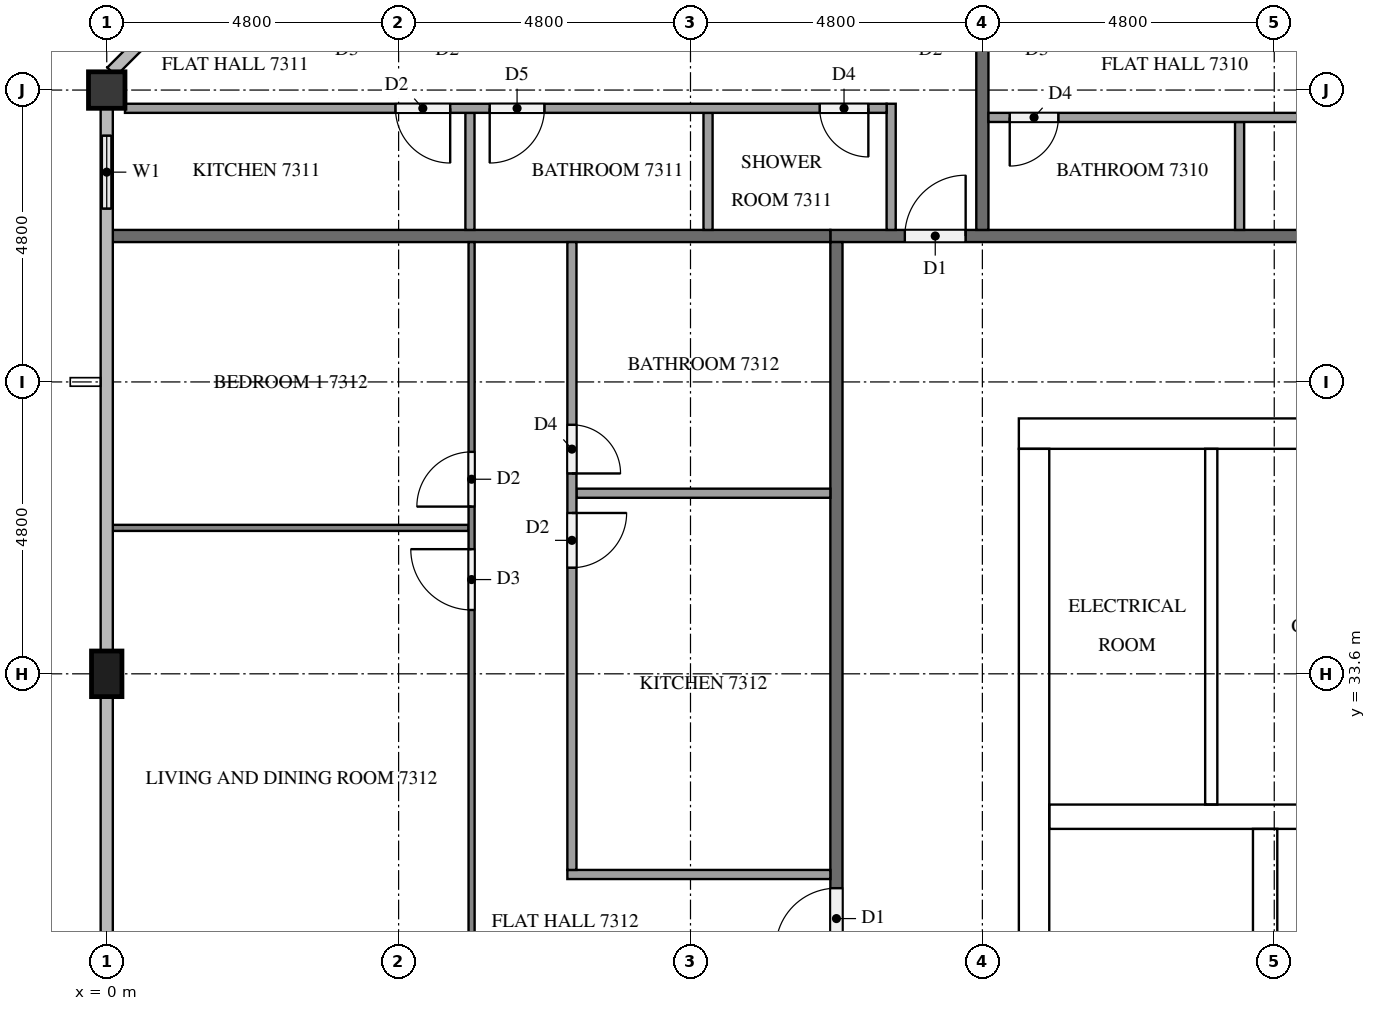
"""IFC4 building model, lengths in metres.
Left out: names, types, materials, properties, quantities, classifications, styles, units other than length and angle.
Written with IfcOpenShell. Run it as: python <this file> out.ifc"""

import sys

from ifc_helpers import new_model, si_unit, direction, frame, frame_2d, origin, origin_2d, place, context, subcontext, project, spatial, rectangle, extrude, element, fill, save


model = new_model("IFC4")
c1 = context("Model", 3, precision=1e-05, world=origin(), true_north=direction((0.0, 1.0)))
c2 = subcontext(c1, "Body", "Model", "MODEL_VIEW")
j1 = project(units=[si_unit("LENGTHUNIT", "METRE"), si_unit("PLANEANGLEUNIT", "RADIAN")], contexts=[c1])
p1 = place(None, origin())
s1 = spatial("IfcSite", under=j1, at=p1, CompositionType="ELEMENT")
p2 = place(p1, origin())
s2 = spatial("IfcBuilding", under=s1, at=p2, CompositionType="ELEMENT")
p3 = place(p2, frame((0.0, 0.0, 279.1)))
s3 = spatial("IfcBuildingStorey", under=s2, at=p3, CompositionType="ELEMENT", Elevation=279.1)
p4 = place(p3, frame((15.0, 37.55, 0.0), z_axis=(0.0, 0.0, 1.0), x_axis=(1.0, 0.0, 0.0)))
e1 = element("IfcWall", 1, at=p4, inside=s3, PredefinedType="SHEAR", context=c2, shape_type="SweptSolid", body=[
    extrude(rectangle(XDim=32.4, YDim=0.5, at=frame_2d((16.2, 0.0))), origin(), (0.0, 0.0, 1.0), 3.2),
])
p5 = place(p4, frame((15.3, 0.0, 0.0)))
e2 = element("IfcOpeningElement", 2, at=p5, cuts=e1, PredefinedType="OPENING", context=c2, shape_type="SweptSolid", body=[
    extrude(rectangle(XDim=1.8, YDim=2.1, at=frame_2d((0.9, 1.05))), frame((0.0, 0.26, 0.0), z_axis=(0.0, -1.0, 0.0), x_axis=(1.0, 0.0, 0.0)), (0.0, 0.0, 1.0), 0.52),
])
p6 = place(p4, frame((1.282, 0.0, 0.0)))
e3 = element("IfcOpeningElement", 3, at=p6, cuts=e1, PredefinedType="OPENING", context=c2, shape_type="SweptSolid", body=[
    extrude(rectangle(XDim=1.0, YDim=2.1, at=frame_2d((0.5, 1.05))), frame((0.0, 0.26, 0.0), z_axis=(0.0, -1.0, 0.0), x_axis=(1.0, 0.0, 0.0)), (0.0, 0.0, 1.0), 0.52),
])
p7 = place(p4, frame((5.082, 0.0, 0.0)))
e4 = element("IfcOpeningElement", 4, at=p7, cuts=e1, PredefinedType="OPENING", context=c2, shape_type="SweptSolid", body=[
    extrude(rectangle(XDim=1.0, YDim=2.1, at=frame_2d((0.5, 1.05))), frame((0.0, 0.26, 0.0), z_axis=(0.0, -1.0, 0.0), x_axis=(1.0, 0.0, 0.0)), (0.0, 0.0, 1.0), 0.52),
])
p8 = place(p3, frame((15.25, 15.5, 0.0), z_axis=(0.0, 0.0, 1.0), x_axis=(0.0, 1.0, 0.0)))
e5 = element("IfcWall", 5, at=p8, inside=s3, PredefinedType="SHEAR", context=c2, shape_type="SweptSolid", body=[
    extrude(rectangle(XDim=21.8, YDim=0.5, at=frame_2d((10.9, 0.0))), origin(), (0.0, 0.0, 1.0), 3.2),
])
p9 = place(p8, frame((5.26, 0.0, 0.0)))
e6 = element("IfcOpeningElement", 6, at=p9, cuts=e5, PredefinedType="OPENING", context=c2, shape_type="SweptSolid", body=[
    extrude(rectangle(XDim=1.2, YDim=2.1, at=frame_2d((0.6, 1.05))), frame((0.0, 0.26, 0.0), z_axis=(0.0, -1.0, 0.0), x_axis=(1.0, 0.0, 0.0)), (0.0, 0.0, 1.0), 0.52),
])
p10 = place(p3, frame((19.05, 15.5, 0.0), z_axis=(0.0, 0.0, 1.0), x_axis=(0.0, 1.0, 0.0)))
e7 = element("IfcWall", 7, at=p10, inside=s3, PredefinedType="SHEAR", context=c2, shape_type="SweptSolid", body=[
    extrude(rectangle(XDim=15.55, YDim=0.4, at=frame_2d((7.775, 0.0))), origin(), (0.0, 0.0, 1.0), 3.2),
])
p11 = place(p10, frame((9.95, 0.0, 0.0)))
e8 = element("IfcOpeningElement", 8, at=p11, cuts=e7, PredefinedType="OPENING", context=c2, shape_type="SweptSolid", body=[
    extrude(rectangle(XDim=1.1, YDim=2.1, at=frame_2d((0.55, 1.05))), frame((0.0, 0.21, 0.0), z_axis=(0.0, -1.0, 0.0), x_axis=(1.0, 0.0, 0.0)), (0.0, 0.0, 1.0), 0.42),
])
p12 = place(p10, frame((13.45, 0.0, 0.0)))
e9 = element("IfcOpeningElement", 9, at=p12, cuts=e7, PredefinedType="OPENING", context=c2, shape_type="SweptSolid", body=[
    extrude(rectangle(XDim=1.1, YDim=2.1, at=frame_2d((0.55, 1.05))), frame((0.0, 0.21, 0.0), z_axis=(0.0, -1.0, 0.0), x_axis=(1.0, 0.0, 0.0)), (0.0, 0.0, 1.0), 0.42),
])
p13 = place(p10, frame((0.7, 0.0, 0.0)))
e10 = element("IfcOpeningElement", 10, at=p13, cuts=e7, PredefinedType="OPENING", context=c2, shape_type="SweptSolid", body=[
    extrude(rectangle(XDim=1.2, YDim=2.1, at=frame_2d((0.6, 1.05))), frame((0.0, 0.21, 0.0), z_axis=(0.0, -1.0, 0.0), x_axis=(1.0, 0.0, 0.0)), (0.0, 0.0, 1.0), 0.42),
])
p14 = place(p3, frame((15.5, 31.25, 0.0), z_axis=(0.0, 0.0, 1.0), x_axis=(1.0, 0.0, 0.0)))
e11 = element("IfcWall", 11, at=p14, inside=s3, PredefinedType="SHEAR", context=c2, shape_type="SweptSolid", body=[
    extrude(rectangle(XDim=7.4, YDim=0.4, at=frame_2d((3.7, 0.0))), origin(), (0.0, 0.0, 1.0), 3.2),
])
p15 = place(p3, frame((0.0, 43.2, 0.0), z_axis=(0.0, 0.0, 1.0), x_axis=(1.0, 0.0, 0.0)))
e12 = element("IfcColumn", 12, at=p15, inside=s3, PredefinedType="COLUMN", context=c2, shape_type="SweptSolid", body=[
    extrude(rectangle(XDim=0.6, YDim=0.6, at=origin_2d()), origin(), (0.0, 0.0, 1.0), 3.2),
])
p16 = place(p3, frame((0.0, 33.6, 0.0), z_axis=(0.0, 0.0, 1.0), x_axis=(0.0, 1.0, 0.0)))
e13 = element("IfcColumn", 13, at=p16, inside=s3, PredefinedType="COLUMN", context=c2, shape_type="SweptSolid", body=[
    extrude(rectangle(XDim=0.75, YDim=0.5, at=origin_2d()), origin(), (0.0, 0.0, 1.0), 3.2),
])
p17 = place(p3, frame((0.0, 42.9, 0.0), z_axis=(0.0, 0.0, 1.0), x_axis=(0.0, -1.0, 0.0)))
e14 = element("IfcWall", 14, at=p17, inside=s3, PredefinedType="SOLIDWALL", context=c2, shape_type="SweptSolid", body=[
    extrude(rectangle(XDim=2.1, YDim=0.15, at=frame_2d((1.05, 0.0))), origin(), (0.0, 0.0, 1.0), 3.2),
])
p18 = place(p17, frame((0.45, 0.0, 0.9)))
e15 = element("IfcOpeningElement", 15, at=p18, cuts=e14, PredefinedType="OPENING", context=c2, shape_type="SweptSolid", body=[
    extrude(rectangle(XDim=1.2, YDim=1.4, at=frame_2d((0.6, 0.7))), frame((0.0, 0.085, 0.0), z_axis=(0.0, -1.0, 0.0), x_axis=(1.0, 0.0, 0.0)), (0.0, 0.0, 1.0), 0.17),
])
p19 = place(p3, frame((18.164, 31.45, 0.0), z_axis=(0.0, 0.0, 1.0), x_axis=(0.0, 1.0, 0.0)))
e16 = element("IfcWall", 16, at=p19, inside=s3, PredefinedType="PARTITIONING", context=c2, shape_type="SweptSolid", body=[
    extrude(rectangle(XDim=5.85, YDim=0.2, at=frame_2d((2.925, 0.0))), origin(), (0.0, 0.0, 1.0), 3.2),
])
p20 = place(p3, frame((11.9, 40.8, 0.0), z_axis=(0.0, 0.0, 1.0), x_axis=(1.0, 0.0, 0.0)))
e17 = element("IfcWall", 17, at=p20, inside=s3, PredefinedType="PARTITIONING", context=c2, shape_type="SweptSolid", body=[
    extrude(rectangle(XDim=38.6, YDim=0.2, at=frame_2d((19.3, 0.0))), origin(), (0.0, 0.0, 1.0), 3.2),
])
p21 = place(p20, frame((33.975, 0.0, 0.0)))
e18 = element("IfcOpeningElement", 18, at=p21, cuts=e17, PredefinedType="OPENING", context=c2, shape_type="SweptSolid", body=[
    extrude(rectangle(XDim=1.0, YDim=2.1, at=frame_2d((0.5, 1.05))), frame((0.0, 0.11, 0.0), z_axis=(0.0, -1.0, 0.0), x_axis=(1.0, 0.0, 0.0)), (0.0, 0.0, 1.0), 0.22),
])
p22 = place(p20, frame((14.725, 0.0, 0.0)))
e19 = element("IfcOpeningElement", 19, at=p22, cuts=e17, PredefinedType="OPENING", context=c2, shape_type="SweptSolid", body=[
    extrude(rectangle(XDim=1.1, YDim=2.1, at=frame_2d((0.55, 1.05))), frame((0.0, 0.11, 0.0), z_axis=(0.0, -1.0, 0.0), x_axis=(1.0, 0.0, 0.0)), (0.0, 0.0, 1.0), 0.22),
])
p23 = place(p20, frame((13.225, 0.0, 0.0)))
e20 = element("IfcOpeningElement", 20, at=p23, cuts=e17, PredefinedType="OPENING", context=c2, shape_type="SweptSolid", body=[
    extrude(rectangle(XDim=1.0, YDim=2.1, at=frame_2d((0.5, 1.05))), frame((0.0, 0.11, 0.0), z_axis=(0.0, -1.0, 0.0), x_axis=(1.0, 0.0, 0.0)), (0.0, 0.0, 1.0), 0.22),
])
p24 = place(p20, frame((1.225, 0.0, 0.0)))
e21 = element("IfcOpeningElement", 21, at=p24, cuts=e17, PredefinedType="OPENING", context=c2, shape_type="SweptSolid", body=[
    extrude(rectangle(XDim=1.0, YDim=2.1, at=frame_2d((0.5, 1.05))), frame((0.0, 0.11, 0.0), z_axis=(0.0, -1.0, 0.0), x_axis=(1.0, 0.0, 0.0)), (0.0, 0.0, 1.0), 0.22),
])
p25 = place(p3, frame((12.0, 12.1, 0.0), z_axis=(0.0, 0.0, 1.0), x_axis=(0.0, 1.0, 0.0)))
e22 = element("IfcWall", 22, at=p25, inside=s3, PredefinedType="PARTITIONING", context=c2, shape_type="SweptSolid", body=[
    extrude(rectangle(XDim=28.6, YDim=0.2, at=frame_2d((14.3, 0.0))), origin(), (0.0, 0.0, 1.0), 3.2),
])
p26 = place(p25, frame((16.975, 0.0, 0.0)))
e23 = element("IfcOpeningElement", 23, at=p26, cuts=e22, PredefinedType="OPENING", context=c2, shape_type="SweptSolid", body=[
    extrude(rectangle(XDim=1.0, YDim=2.1, at=frame_2d((0.5, 1.05))), frame((0.0, 0.11, 0.0), z_axis=(0.0, -1.0, 0.0), x_axis=(1.0, 0.0, 0.0)), (0.0, 0.0, 1.0), 0.22),
])
p27 = place(p25, frame((0.175, 0.0, 0.0)))
e24 = element("IfcOpeningElement", 24, at=p27, cuts=e22, PredefinedType="OPENING", context=c2, shape_type="SweptSolid", body=[
    extrude(rectangle(XDim=1.0, YDim=2.1, at=frame_2d((0.5, 1.05))), frame((0.0, 0.11, 0.0), z_axis=(0.0, -1.0, 0.0), x_axis=(1.0, 0.0, 0.0)), (0.0, 0.0, 1.0), 0.22),
])
p28 = place(p3, frame((14.4, 47.75, 0.0), z_axis=(0.0, 0.0, 1.0), x_axis=(0.0, -1.0, 0.0)))
e25 = element("IfcWall", 25, at=p28, inside=s3, PredefinedType="PARTITIONING", context=c2, shape_type="SweptSolid", body=[
    extrude(rectangle(XDim=6.85, YDim=0.2, at=frame_2d((3.425, 0.0))), origin(), (0.0, 0.0, 1.0), 3.2),
])
p29 = place(p3, frame((0.1, 40.8, 0.0), z_axis=(0.0, 0.0, 1.0), x_axis=(1.0, 0.0, 0.0)))
e26 = element("IfcWall", 26, at=p29, inside=s3, PredefinedType="PARTITIONING", context=c2, shape_type="SweptSolid", body=[
    extrude(rectangle(XDim=11.8, YDim=0.2, at=frame_2d((5.9, 0.0))), origin(), (0.0, 0.0, 1.0), 3.2),
])
p30 = place(p3, frame((18.63, 40.9, 0.0), z_axis=(0.0, 0.0, 1.0), x_axis=(0.0, 1.0, 0.0)))
e27 = element("IfcWall", 27, at=p30, inside=s3, PredefinedType="PARTITIONING", context=c2, shape_type="SweptSolid", body=[
    extrude(rectangle(XDim=1.775, YDim=0.15, at=frame_2d((0.888, 0.0))), origin(), (0.0, 0.0, 1.0), 3.2),
])
p31 = place(p3, frame((24.825, 42.75, 0.0), z_axis=(0.0, 0.0, 1.0), x_axis=(-1.0, 0.0, 0.0)))
e28 = element("IfcWall", 28, at=p31, inside=s3, PredefinedType="PARTITIONING", context=c2, shape_type="SweptSolid", body=[
    extrude(rectangle(XDim=10.325, YDim=0.15, at=frame_2d((5.163, 0.0))), origin(), (0.0, 0.0, 1.0), 3.2),
])
p32 = place(p31, frame((0.3, 0.0, 0.0)))
e29 = element("IfcOpeningElement", 29, at=p32, cuts=e28, PredefinedType="OPENING", context=c2, shape_type="SweptSolid", body=[
    extrude(rectangle(XDim=0.9, YDim=2.1, at=frame_2d((0.45, 1.05))), frame((0.0, 0.085, 0.0), z_axis=(0.0, -1.0, 0.0), x_axis=(1.0, 0.0, 0.0)), (0.0, 0.0, 1.0), 0.17),
])
p33 = place(p31, frame((9.175, 0.0, 0.0)))
e30 = element("IfcOpeningElement", 30, at=p33, cuts=e28, PredefinedType="OPENING", context=c2, shape_type="SweptSolid", body=[
    extrude(rectangle(XDim=0.8, YDim=2.1, at=frame_2d((0.4, 1.05))), frame((0.0, 0.085, 0.0), z_axis=(0.0, -1.0, 0.0), x_axis=(1.0, 0.0, 0.0)), (0.0, 0.0, 1.0), 0.17),
])
for number, where, z_axis, x_axis in (
    (31, (9.888, 40.9, 0.0), (0.0, 0.0, 1.0), (0.0, 1.0, 0.0)),
    (32, (5.973, 40.9, 0.0), (0.0, 0.0, 1.0), (0.0, 1.0, 0.0)),
):
    element("IfcWall", number, at=place(p3, frame(where, z_axis=z_axis, x_axis=x_axis)), inside=s3, PredefinedType="PARTITIONING", context=c2, shape_type="SweptSolid", body=[
        extrude(rectangle(XDim=1.925, YDim=0.15, at=frame_2d((0.962, 0.0))), origin(), (0.0, 0.0, 1.0), 3.2),
    ])
p34 = place(p3, frame((12.9, 40.9, 0.0), z_axis=(0.0, 0.0, 1.0), x_axis=(0.0, 1.0, 0.0)))
e33 = element("IfcWall", 33, at=p34, inside=s3, PredefinedType="PARTITIONING", context=c2, shape_type="SweptSolid", body=[
    extrude(rectangle(XDim=2.075, YDim=0.15, at=frame_2d((1.038, 0.0))), origin(), (0.0, 0.0, 1.0), 3.2),
])
p35 = place(p3, frame((12.825, 42.9, 0.0), z_axis=(0.0, 0.0, 1.0), x_axis=(-1.0, 0.0, 0.0)))
e34 = element("IfcWall", 34, at=p35, inside=s3, PredefinedType="PARTITIONING", context=c2, shape_type="SweptSolid", body=[
    extrude(rectangle(XDim=12.525, YDim=0.15, at=frame_2d((6.262, 0.0))), origin(), (0.0, 0.0, 1.0), 3.2),
])
p36 = place(p35, frame((0.3, 0.0, 0.0)))
e35 = element("IfcOpeningElement", 35, at=p36, cuts=e34, PredefinedType="OPENING", context=c2, shape_type="SweptSolid", body=[
    extrude(rectangle(XDim=0.8, YDim=2.1, at=frame_2d((0.4, 1.05))), frame((0.0, 0.085, 0.0), z_axis=(0.0, -1.0, 0.0), x_axis=(1.0, 0.0, 0.0)), (0.0, 0.0, 1.0), 0.17),
])
p37 = place(p35, frame((5.627, 0.0, 0.0)))
e36 = element("IfcOpeningElement", 36, at=p37, cuts=e34, PredefinedType="OPENING", context=c2, shape_type="SweptSolid", body=[
    extrude(rectangle(XDim=0.9, YDim=2.1, at=frame_2d((0.45, 1.05))), frame((0.0, 0.085, 0.0), z_axis=(0.0, -1.0, 0.0), x_axis=(1.0, 0.0, 0.0)), (0.0, 0.0, 1.0), 0.17),
])
p38 = place(p35, frame((7.177, 0.0, 0.0)))
e37 = element("IfcOpeningElement", 37, at=p38, cuts=e34, PredefinedType="OPENING", context=c2, shape_type="SweptSolid", body=[
    extrude(rectangle(XDim=0.9, YDim=2.1, at=frame_2d((0.45, 1.05))), frame((0.0, 0.085, 0.0), z_axis=(0.0, -1.0, 0.0), x_axis=(1.0, 0.0, 0.0)), (0.0, 0.0, 1.0), 0.17),
])
p39 = place(p3, frame((5.95, 36.0, 0.0), z_axis=(0.0, 0.0, 1.0), x_axis=(-1.0, 0.0, 0.0)))
e38 = element("IfcWall", 38, at=p39, inside=s3, PredefinedType="PARTITIONING", context=c2, shape_type="SweptSolid", body=[
    extrude(rectangle(XDim=5.85, YDim=0.1, at=frame_2d((2.925, 0.0))), origin(), (0.0, 0.0, 1.0), 3.2),
])
p40 = place(p3, frame((6.0, 28.9, 0.0), z_axis=(0.0, 0.0, 1.0), x_axis=(0.0, 1.0, 0.0)))
e39 = element("IfcWall", 39, at=p40, inside=s3, PredefinedType="PARTITIONING", context=c2, shape_type="SweptSolid", body=[
    extrude(rectangle(XDim=11.8, YDim=0.1, at=frame_2d((5.9, 0.0))), origin(), (0.0, 0.0, 1.0), 3.2),
])
p41 = place(p40, frame((5.75, 0.0, 0.0)))
e40 = element("IfcOpeningElement", 40, at=p41, cuts=e39, PredefinedType="OPENING", context=c2, shape_type="SweptSolid", body=[
    extrude(rectangle(XDim=1.0, YDim=2.1, at=frame_2d((0.5, 1.05))), frame((0.0, 0.06, 0.0), z_axis=(0.0, -1.0, 0.0), x_axis=(1.0, 0.0, 0.0)), (0.0, 0.0, 1.0), 0.12),
])
p42 = place(p40, frame((7.45, 0.0, 0.0)))
e41 = element("IfcOpeningElement", 41, at=p42, cuts=e39, PredefinedType="OPENING", context=c2, shape_type="SweptSolid", body=[
    extrude(rectangle(XDim=0.9, YDim=2.1, at=frame_2d((0.45, 1.05))), frame((0.0, 0.06, 0.0), z_axis=(0.0, -1.0, 0.0), x_axis=(1.0, 0.0, 0.0)), (0.0, 0.0, 1.0), 0.12),
])
p43 = place(p3, frame((11.9, 36.57, 0.0), z_axis=(0.0, 0.0, 1.0), x_axis=(-1.0, 0.0, 0.0)))
e42 = element("IfcWall", 42, at=p43, inside=s3, PredefinedType="PARTITIONING", context=c2, shape_type="SweptSolid", body=[
    extrude(rectangle(XDim=4.175, YDim=0.15, at=frame_2d((2.087, 0.0))), origin(), (0.0, 0.0, 1.0), 3.2),
])
p44 = place(p3, frame((11.9, 30.3, 0.0), z_axis=(0.0, 0.0, 1.0), x_axis=(-1.0, 0.0, 0.0)))
e43 = element("IfcWall", 43, at=p44, inside=s3, PredefinedType="PARTITIONING", context=c2, shape_type="SweptSolid", body=[
    extrude(rectangle(XDim=4.325, YDim=0.15, at=frame_2d((2.163, 0.0))), origin(), (0.0, 0.0, 1.0), 3.2),
])
p45 = place(p3, frame((7.65, 40.7, 0.0), z_axis=(0.0, 0.0, 1.0), x_axis=(0.0, -1.0, 0.0)))
e44 = element("IfcWall", 44, at=p45, inside=s3, PredefinedType="PARTITIONING", context=c2, shape_type="SweptSolid", body=[
    extrude(rectangle(XDim=10.325, YDim=0.15, at=frame_2d((5.163, 0.0))), origin(), (0.0, 0.0, 1.0), 3.2),
])
p46 = place(p45, frame((4.455, 0.0, 0.0)))
e45 = element("IfcOpeningElement", 45, at=p46, cuts=e44, PredefinedType="OPENING", context=c2, shape_type="SweptSolid", body=[
    extrude(rectangle(XDim=0.9, YDim=2.1, at=frame_2d((0.45, 1.05))), frame((0.0, 0.085, 0.0), z_axis=(0.0, -1.0, 0.0), x_axis=(1.0, 0.0, 0.0)), (0.0, 0.0, 1.0), 0.17),
])
p47 = place(p45, frame((3.005, 0.0, 0.0)))
e46 = element("IfcOpeningElement", 46, at=p47, cuts=e44, PredefinedType="OPENING", context=c2, shape_type="SweptSolid", body=[
    extrude(rectangle(XDim=0.8, YDim=2.1, at=frame_2d((0.4, 1.05))), frame((0.0, 0.085, 0.0), z_axis=(0.0, -1.0, 0.0), x_axis=(1.0, 0.0, 0.0)), (0.0, 0.0, 1.0), 0.17),
])
p48 = place(p18, origin())
e47 = element("IfcWindow", 47, at=p48, inside=s3, PartitioningType="SINGLE_PANEL", PredefinedType="WINDOW", context=c2, shape_type="SweptSolid", body=[
    extrude(rectangle(XDim=1.2, YDim=1.4, at=frame_2d((0.6, 0.7))), frame((0.0, 0.03, 0.0), z_axis=(0.0, -1.0, 0.0), x_axis=(1.0, 0.0, 0.0)), (0.0, 0.0, 1.0), 0.06),
])
fill(e15, e47)
p49 = place(p12, origin())
e48 = element("IfcDoor", 48, at=p49, inside=s3, OperationType="DOUBLE_DOOR_SLIDING", PredefinedType="DOOR", context=c2, shape_type="SweptSolid", body=[
    extrude(rectangle(XDim=1.1, YDim=2.1, at=frame_2d((0.55, 1.05))), frame((0.0, 0.025, 0.0), z_axis=(0.0, -1.0, 0.0), x_axis=(1.0, 0.0, 0.0)), (0.0, 0.0, 1.0), 0.05),
])
fill(e9, e48)
p50 = place(p6, origin())
e49 = element("IfcDoor", 49, at=p50, inside=s3, OperationType="SINGLE_SWING_RIGHT", PredefinedType="DOOR", context=c2, shape_type="SweptSolid", body=[
    extrude(rectangle(XDim=1.0, YDim=2.1, at=frame_2d((0.5, 1.05))), frame((0.0, 0.025, 0.0), z_axis=(0.0, -1.0, 0.0), x_axis=(1.0, 0.0, 0.0)), (0.0, 0.0, 1.0), 0.05),
])
fill(e3, e49)
p51 = place(p24, origin())
e50 = element("IfcDoor", 50, at=p51, inside=s3, OperationType="SINGLE_SWING_RIGHT", PredefinedType="DOOR", context=c2, shape_type="SweptSolid", body=[
    extrude(rectangle(XDim=1.0, YDim=2.1, at=frame_2d((0.5, 1.05))), frame((0.0, 0.025, 0.0), z_axis=(0.0, -1.0, 0.0), x_axis=(1.0, 0.0, 0.0)), (0.0, 0.0, 1.0), 0.05),
])
fill(e21, e50)
p52 = place(p26, origin())
e51 = element("IfcDoor", 51, at=p52, inside=s3, OperationType="SINGLE_SWING_LEFT", PredefinedType="DOOR", context=c2, shape_type="SweptSolid", body=[
    extrude(rectangle(XDim=1.0, YDim=2.1, at=frame_2d((0.5, 1.05))), frame((0.0, 0.025, 0.0), z_axis=(0.0, -1.0, 0.0), x_axis=(1.0, 0.0, 0.0)), (0.0, 0.0, 1.0), 0.05),
])
fill(e23, e51)
p53 = place(p33, origin())
e52 = element("IfcDoor", 52, at=p53, inside=s3, OperationType="SINGLE_SWING_RIGHT", PredefinedType="DOOR", context=c2, shape_type="SweptSolid", body=[
    extrude(rectangle(XDim=0.8, YDim=2.1, at=frame_2d((0.4, 1.05))), frame((0.0, 0.025, 0.0), z_axis=(0.0, -1.0, 0.0), x_axis=(1.0, 0.0, 0.0)), (0.0, 0.0, 1.0), 0.05),
])
fill(e30, e52)
p54 = place(p36, origin())
e53 = element("IfcDoor", 53, at=p54, inside=s3, OperationType="SINGLE_SWING_LEFT", PredefinedType="DOOR", context=c2, shape_type="SweptSolid", body=[
    extrude(rectangle(XDim=0.8, YDim=2.1, at=frame_2d((0.4, 1.05))), frame((0.0, 0.025, 0.0), z_axis=(0.0, -1.0, 0.0), x_axis=(1.0, 0.0, 0.0)), (0.0, 0.0, 1.0), 0.05),
])
fill(e35, e53)
p55 = place(p37, origin())
e54 = element("IfcDoor", 54, at=p55, inside=s3, OperationType="SINGLE_SWING_RIGHT", PredefinedType="DOOR", context=c2, shape_type="SweptSolid", body=[
    extrude(rectangle(XDim=0.9, YDim=2.1, at=frame_2d((0.45, 1.05))), frame((0.0, 0.025, 0.0), z_axis=(0.0, -1.0, 0.0), x_axis=(1.0, 0.0, 0.0)), (0.0, 0.0, 1.0), 0.05),
])
fill(e36, e54)
p56 = place(p38, origin())
e55 = element("IfcDoor", 55, at=p56, inside=s3, OperationType="SINGLE_SWING_LEFT", PredefinedType="DOOR", context=c2, shape_type="SweptSolid", body=[
    extrude(rectangle(XDim=0.9, YDim=2.1, at=frame_2d((0.45, 1.05))), frame((0.0, 0.025, 0.0), z_axis=(0.0, -1.0, 0.0), x_axis=(1.0, 0.0, 0.0)), (0.0, 0.0, 1.0), 0.05),
])
fill(e37, e55)
p57 = place(p41, origin())
e56 = element("IfcDoor", 56, at=p57, inside=s3, OperationType="SINGLE_SWING_RIGHT", PredefinedType="DOOR", context=c2, shape_type="SweptSolid", body=[
    extrude(rectangle(XDim=1.0, YDim=2.1, at=frame_2d((0.5, 1.05))), frame((0.0, 0.025, 0.0), z_axis=(0.0, -1.0, 0.0), x_axis=(1.0, 0.0, 0.0)), (0.0, 0.0, 1.0), 0.05),
])
fill(e40, e56)
p58 = place(p42, origin())
e57 = element("IfcDoor", 57, at=p58, inside=s3, OperationType="SINGLE_SWING_LEFT", PredefinedType="DOOR", context=c2, shape_type="SweptSolid", body=[
    extrude(rectangle(XDim=0.9, YDim=2.1, at=frame_2d((0.45, 1.05))), frame((0.0, 0.025, 0.0), z_axis=(0.0, -1.0, 0.0), x_axis=(1.0, 0.0, 0.0)), (0.0, 0.0, 1.0), 0.05),
])
fill(e41, e57)
p59 = place(p46, origin())
e58 = element("IfcDoor", 58, at=p59, inside=s3, OperationType="SINGLE_SWING_LEFT", PredefinedType="DOOR", context=c2, shape_type="SweptSolid", body=[
    extrude(rectangle(XDim=0.9, YDim=2.1, at=frame_2d((0.45, 1.05))), frame((0.0, 0.025, 0.0), z_axis=(0.0, -1.0, 0.0), x_axis=(1.0, 0.0, 0.0)), (0.0, 0.0, 1.0), 0.05),
])
fill(e45, e58)
p60 = place(p47, origin())
e59 = element("IfcDoor", 59, at=p60, inside=s3, OperationType="SINGLE_SWING_RIGHT", PredefinedType="DOOR", context=c2, shape_type="SweptSolid", body=[
    extrude(rectangle(XDim=0.8, YDim=2.1, at=frame_2d((0.4, 1.05))), frame((0.0, 0.025, 0.0), z_axis=(0.0, -1.0, 0.0), x_axis=(1.0, 0.0, 0.0)), (0.0, 0.0, 1.0), 0.05),
])
fill(e46, e59)
save(model, sys.argv[1])
